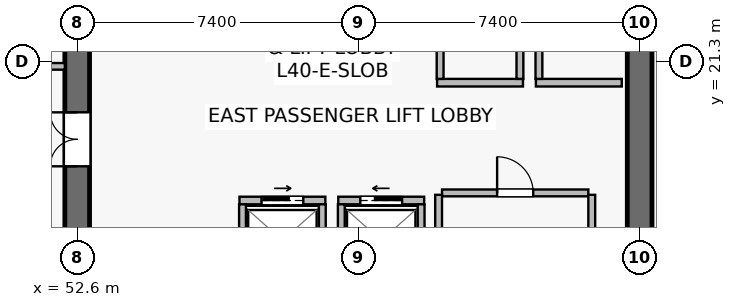
"""IFC4 building model, lengths in metres.
Left out: names, types, materials, properties, quantities, classifications, styles, units other than length and angle.
Written with IfcOpenShell. Run it as: python <this file> out.ifc"""

import sys

from ifc_helpers import new_model, si_unit, direction, frame, frame_2d, origin, place, context, subcontext, project, spatial, rectangle, extrude, source, transform, mapped, element, fill, save


model = new_model("IFC4")
c1 = context("Model", 3, precision=1e-05, world=origin(), true_north=direction((0.0, 1.0)))
c2 = subcontext(c1, "Body", "Model", "MODEL_VIEW")
j1 = project(units=[si_unit("LENGTHUNIT", "METRE"), si_unit("PLANEANGLEUNIT", "RADIAN")], contexts=[c1])
p1 = place(None, origin())
s1 = spatial("IfcSite", under=j1, at=p1, CompositionType="ELEMENT")
p2 = place(p1, origin())
s2 = spatial("IfcBuilding", under=s1, at=p2, CompositionType="ELEMENT")
p3 = place(p2, frame((0.0, 0.0, 166.6)))
s3 = spatial("IfcBuildingStorey", under=s2, at=p3, CompositionType="ELEMENT", Elevation=166.6)
p4 = place(p3, frame((52.6, 15.125, 0.0), z_axis=(0.0, 0.0, 1.0), x_axis=(0.0, 1.0, 0.0)))
e1 = element("IfcWall", 1, at=p4, inside=s3, PredefinedType="SHEAR", context=c2, shape_type="SweptSolid", body=[
    extrude(rectangle(XDim=18.35, YDim=0.65, at=frame_2d((9.175, 0.0))), origin(), (0.0, 0.0, 1.0), 3.79),
])
p5 = place(p4, frame((3.425, 0.0, 0.0)))
e2 = element("IfcOpeningElement", 2, at=p5, cuts=e1, PredefinedType="OPENING", context=c2, shape_type="SweptSolid", body=[
    extrude(rectangle(XDim=1.42, YDim=2.2, at=frame_2d((0.71, 1.1))), frame((0.0, 0.335, 0.0), z_axis=(0.0, -1.0, 0.0), x_axis=(1.0, 0.0, 0.0)), (0.0, 0.0, 1.0), 0.67),
])
p6 = place(p3, frame((67.4, 15.125, 0.0), z_axis=(0.0, 0.0, 1.0), x_axis=(0.0, 1.0, 0.0)))
e3 = element("IfcWall", 3, at=p6, inside=s3, PredefinedType="SHEAR", context=c2, shape_type="SweptSolid", body=[
    extrude(rectangle(XDim=18.35, YDim=0.65, at=frame_2d((9.175, 0.0))), origin(), (0.0, 0.0, 1.0), 3.79),
])
p7 = place(p3, frame((59.47, 17.65, 0.0), z_axis=(0.0, 0.0, 1.0), x_axis=(1.0, 0.0, 0.0)))
e4 = element("IfcWall", 4, at=p7, inside=s3, PredefinedType="SOLIDWALL", context=c2, shape_type="SweptSolid", body=[
    extrude(rectangle(XDim=2.26, YDim=0.2, at=frame_2d((1.13, 0.0))), origin(), (0.0, 0.0, 1.0), 3.187),
])
p8 = place(p7, frame((0.58, 0.0, 0.0)))
e5 = element("IfcOpeningElement", 5, at=p8, cuts=e4, PredefinedType="OPENING", context=c2, shape_type="SweptSolid", body=[
    extrude(rectangle(XDim=1.1, YDim=2.22, at=frame_2d((0.55, 1.11))), frame((0.0, 0.11, 0.0), z_axis=(0.0, -1.0, 0.0), x_axis=(1.0, 0.0, 0.0)), (0.0, 0.0, 1.0), 0.22),
])
for number, where, z_axis, x_axis in (
    (6, (59.55, 15.65, 0.0), (0.0, 0.0, 1.0), (0.0, 1.0, 0.0)),
    (7, (61.65, 15.65, 0.0), (0.0, 0.0, 1.0), (0.0, 1.0, 0.0)),
):
    element("IfcWall", number, at=place(p3, frame(where, z_axis=z_axis, x_axis=x_axis)), inside=s3, PredefinedType="SOLIDWALL", context=c2, shape_type="SweptSolid", body=[
        extrude(rectangle(XDim=1.9, YDim=0.18, at=frame_2d((0.95, 0.0))), origin(), (0.0, 0.0, 1.0), 3.79),
    ])
p9 = place(p3, frame((56.87, 17.65, 0.0), z_axis=(0.0, 0.0, 1.0), x_axis=(1.0, 0.0, 0.0)))
e8 = element("IfcWall", 8, at=p9, inside=s3, PredefinedType="SOLIDWALL", context=c2, shape_type="SweptSolid", body=[
    extrude(rectangle(XDim=2.26, YDim=0.2, at=frame_2d((1.13, 0.0))), origin(), (0.0, 0.0, 1.0), 3.79),
])
p10 = place(p9, frame((0.58, 0.0, 0.0)))
e9 = element("IfcOpeningElement", 9, at=p10, cuts=e8, PredefinedType="OPENING", context=c2, shape_type="SweptSolid", body=[
    extrude(rectangle(XDim=1.1, YDim=2.22, at=frame_2d((0.55, 1.11))), frame((0.0, 0.11, 0.0), z_axis=(0.0, -1.0, 0.0), x_axis=(1.0, 0.0, 0.0)), (0.0, 0.0, 1.0), 0.22),
])
for number, where, z_axis, x_axis in (
    (10, (56.95, 15.65, 0.0), (0.0, 0.0, 1.0), (0.0, 1.0, 0.0)),
    (11, (59.05, 15.65, 0.0), (0.0, 0.0, 1.0), (0.0, 1.0, 0.0)),
):
    element("IfcWall", number, at=place(p3, frame(where, z_axis=z_axis, x_axis=x_axis)), inside=s3, PredefinedType="SOLIDWALL", context=c2, shape_type="SweptSolid", body=[
        extrude(rectangle(XDim=1.9, YDim=0.18, at=frame_2d((0.95, 0.0))), origin(), (0.0, 0.0, 1.0), 3.79),
    ])
p11 = place(p3, frame((64.67, 20.75, 0.0), z_axis=(0.0, 0.0, 1.0), x_axis=(1.0, 0.0, 0.0)))
e12 = element("IfcWall", 12, at=p11, inside=s3, PredefinedType="SOLIDWALL", context=c2, shape_type="SweptSolid", body=[
    extrude(rectangle(XDim=2.26, YDim=0.2, at=frame_2d((1.13, 0.0))), origin(), (0.0, 0.0, 1.0), 3.79),
])
p12 = place(p3, frame((64.75, 20.85, 0.0), z_axis=(0.0, 0.0, 1.0), x_axis=(0.0, 1.0, 0.0)))
e13 = element("IfcWall", 13, at=p12, inside=s3, PredefinedType="SOLIDWALL", context=c2, shape_type="SweptSolid", body=[
    extrude(rectangle(XDim=1.9, YDim=0.18, at=frame_2d((0.95, 0.0))), origin(), (0.0, 0.0, 1.0), 3.79),
])
p13 = place(p3, frame((62.07, 20.75, 0.0), z_axis=(0.0, 0.0, 1.0), x_axis=(1.0, 0.0, 0.0)))
e14 = element("IfcWall", 14, at=p13, inside=s3, PredefinedType="SOLIDWALL", context=c2, shape_type="SweptSolid", body=[
    extrude(rectangle(XDim=2.26, YDim=0.2, at=frame_2d((1.13, 0.0))), origin(), (0.0, 0.0, 1.0), 3.79),
])
for number, where, z_axis, x_axis in (
    (15, (62.15, 20.85, 0.0), (0.0, 0.0, 1.0), (0.0, 1.0, 0.0)),
    (16, (64.25, 20.85, 0.0), (0.0, 0.0, 1.0), (0.0, 1.0, 0.0)),
):
    element("IfcWall", number, at=place(p3, frame(where, z_axis=z_axis, x_axis=x_axis)), inside=s3, PredefinedType="SOLIDWALL", context=c2, shape_type="SweptSolid", body=[
        extrude(rectangle(XDim=1.9, YDim=0.18, at=frame_2d((0.95, 0.0))), origin(), (0.0, 0.0, 1.0), 3.79),
    ])
p14 = place(p3, frame((62.2, 17.85, 0.0), z_axis=(0.0, 0.0, 1.0), x_axis=(1.0, 0.0, 0.0)))
e17 = element("IfcWall", 17, at=p14, inside=s3, PredefinedType="SOLIDWALL", context=c2, shape_type="SweptSolid", body=[
    extrude(rectangle(XDim=3.85, YDim=0.18, at=frame_2d((1.925, 0.0))), origin(), (0.0, 0.0, 1.0), 3.79),
])
p15 = place(p14, frame((1.45, 0.0, 0.0)))
e18 = element("IfcOpeningElement", 18, at=p15, cuts=e17, PredefinedType="OPENING", context=c2, shape_type="SweptSolid", body=[
    extrude(rectangle(XDim=0.95, YDim=2.15, at=frame_2d((0.475, 1.075))), frame((0.0, 0.1, 0.0), z_axis=(0.0, -1.0, 0.0), x_axis=(1.0, 0.0, 0.0)), (0.0, 0.0, 1.0), 0.2),
])
for number, where, z_axis, x_axis in (
    (19, (62.11, 15.4, 0.0), (0.0, 0.0, 1.0), (0.0, 1.0, 0.0)),
    (20, (66.14, 15.4, 0.0), (0.0, 0.0, 1.0), (0.0, 1.0, 0.0)),
):
    element("IfcWall", number, at=place(p3, frame(where, z_axis=z_axis, x_axis=x_axis)), inside=s3, PredefinedType="SOLIDWALL", context=c2, shape_type="SweptSolid", body=[
        extrude(rectangle(XDim=2.4, YDim=0.18, at=frame_2d((1.2, 0.0))), origin(), (0.0, 0.0, 1.0), 3.79),
    ])
p16 = place(p3, frame((48.3, 21.18, 0.0), z_axis=(0.0, 0.0, 1.0), x_axis=(1.0, 0.0, 0.0)))
e21 = element("IfcWall", 21, at=p16, inside=s3, PredefinedType="PARTITIONING", context=c2, shape_type="SweptSolid", body=[
    extrude(rectangle(XDim=3.975, YDim=0.175, at=frame_2d((1.987, 0.0))), origin(), (0.0, 0.0, 1.0), 3.79),
])
p17 = place(p16, frame((1.35, 0.0, 0.0)))
e22 = element("IfcOpeningElement", 22, at=p17, cuts=e21, PredefinedType="OPENING", context=c2, shape_type="SweptSolid", body=[
    extrude(rectangle(XDim=0.95, YDim=2.15, at=frame_2d((0.475, 1.075))), frame((0.0, 0.098, 0.0), z_axis=(0.0, -1.0, 0.0), x_axis=(1.0, 0.0, 0.0)), (0.0, 0.0, 1.0), 0.195),
])
m1 = source(origin(), c2, "Body", "SweptSolid", [
    extrude(rectangle(XDim=1.1, YDim=2.22, at=frame_2d((0.55, 1.11))), frame((0.0, 0.025, 0.0), z_axis=(0.0, -1.0, 0.0), x_axis=(1.0, 0.0, 0.0)), (0.0, 0.0, 1.0), 0.05),
])
p18 = place(p8, origin())
e23 = element("IfcDoor", 23, at=p18, inside=s3, OperationType="SLIDING_TO_LEFT", PredefinedType="USERDEFINED", context=c2, shape_type="MappedRepresentation", body=[
    mapped(m1, transform((0.0, 0.0, 0.0), scale=1.0)),
])
fill(e5, e23)
p19 = place(p10, origin())
e24 = element("IfcDoor", 24, at=p19, inside=s3, OperationType="SLIDING_TO_RIGHT", PredefinedType="USERDEFINED", context=c2, shape_type="MappedRepresentation", body=[
    mapped(m1, transform((0.0, 0.0, 0.0), scale=1.0)),
])
fill(e9, e24)
m2 = source(origin(), c2, "Body", "SweptSolid", [
    extrude(rectangle(XDim=0.95, YDim=2.15, at=frame_2d((0.475, 1.075))), frame((0.0, 0.025, 0.0), z_axis=(0.0, -1.0, 0.0), x_axis=(1.0, 0.0, 0.0)), (0.0, 0.0, 1.0), 0.05),
])
p20 = place(p15, origin())
e25 = element("IfcDoor", 25, at=p20, inside=s3, OperationType="SINGLE_SWING_LEFT", PredefinedType="DOOR", context=c2, shape_type="MappedRepresentation", body=[
    mapped(m2, transform((0.0, 0.0, 0.0), scale=1.0)),
])
fill(e18, e25)
m3 = source(origin(), c2, "Body", "SweptSolid", [
    extrude(rectangle(XDim=1.42, YDim=2.2, at=frame_2d((0.71, 1.1))), frame((0.0, 0.025, 0.0), z_axis=(0.0, -1.0, 0.0), x_axis=(1.0, 0.0, 0.0)), (0.0, 0.0, 1.0), 0.05),
])
p21 = place(p5, origin())
e26 = element("IfcDoor", 26, at=p21, inside=s3, OperationType="DOUBLE_DOOR_SINGLE_SWING", PredefinedType="DOOR", context=c2, shape_type="MappedRepresentation", body=[
    mapped(m3, transform((0.0, 0.0, 0.0), scale=1.0)),
])
fill(e2, e26)
save(model, sys.argv[1])
